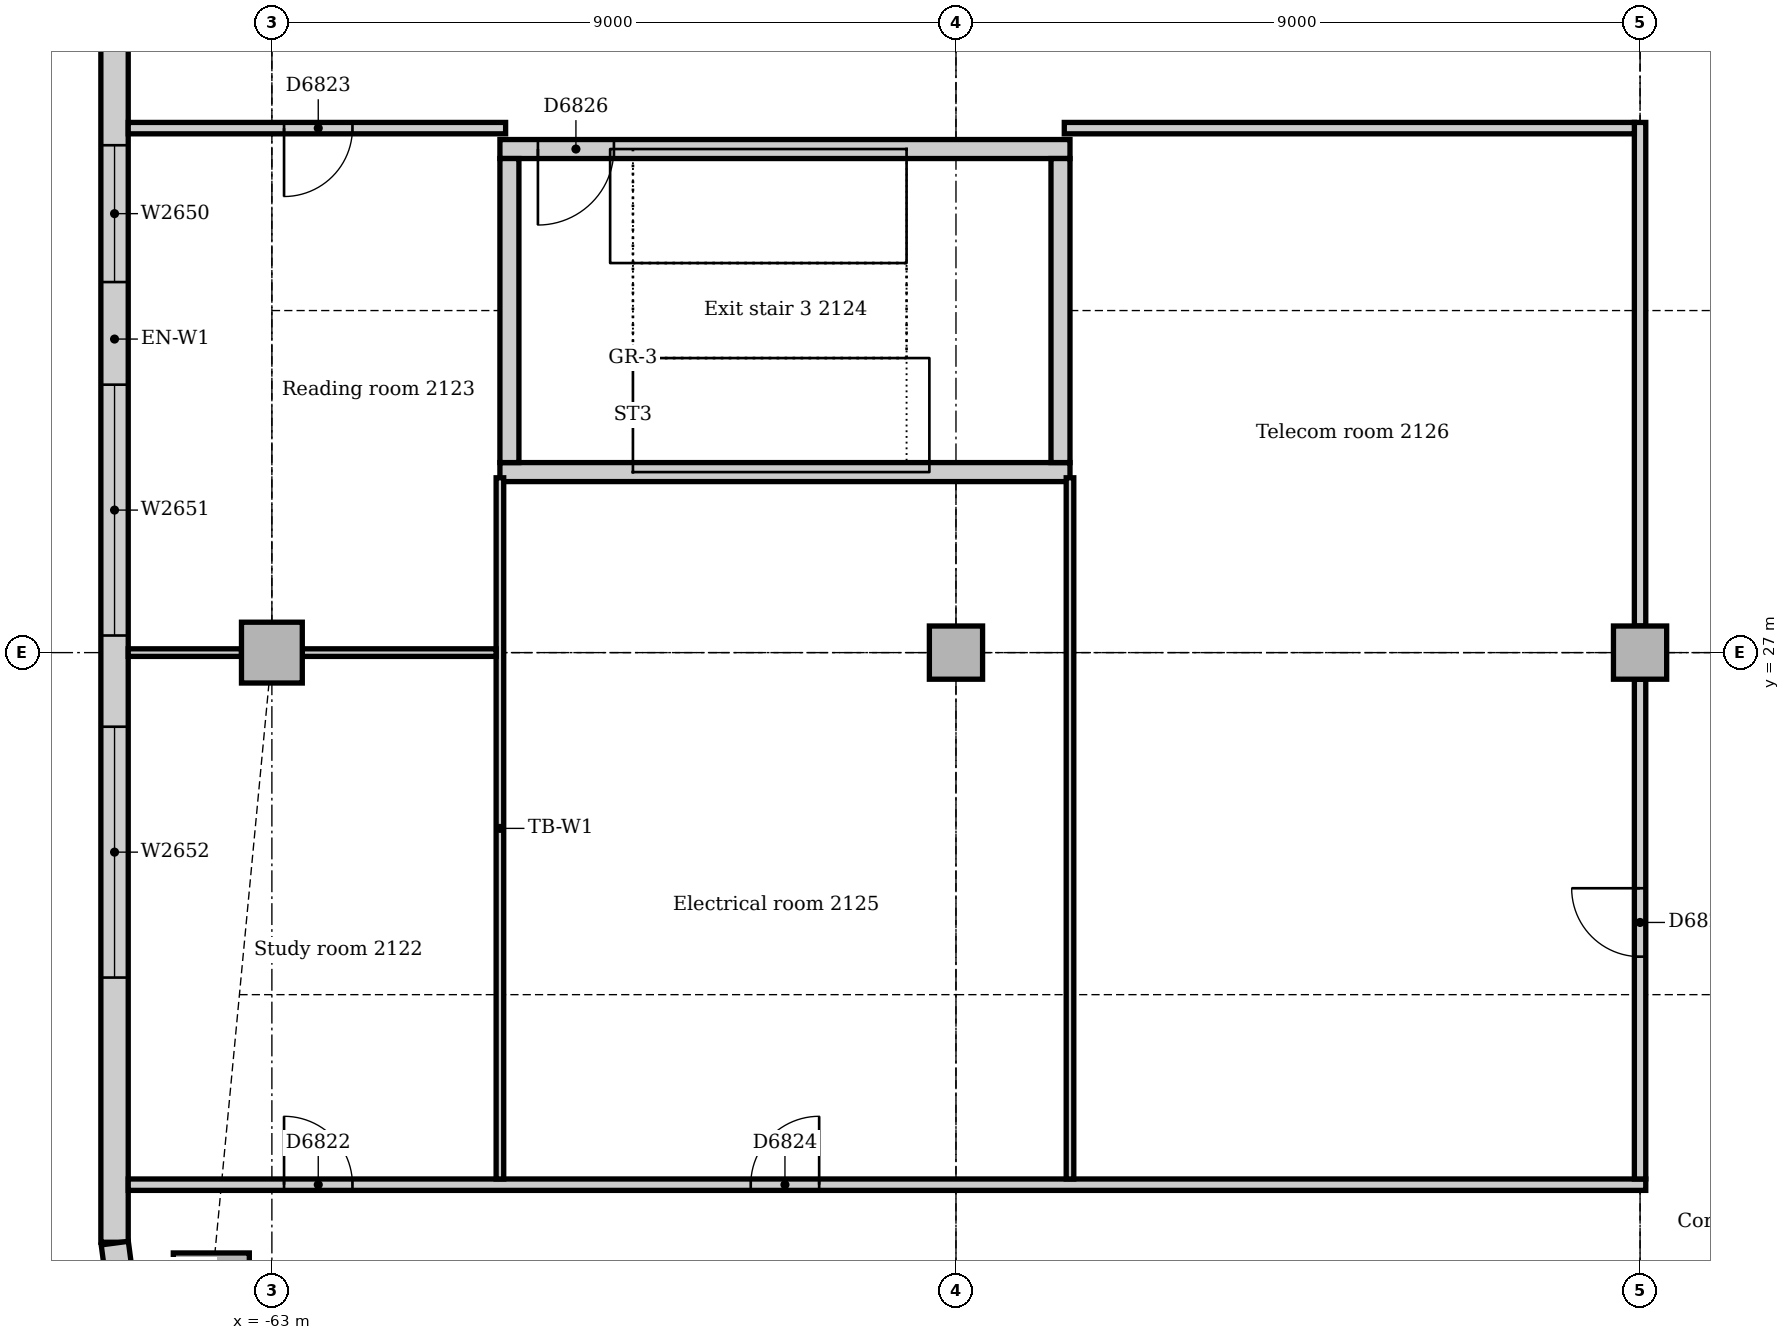
"""IFC4 building model, lengths in metres.
Left out: names, types, materials, properties, quantities, classifications, styles, units other than length and angle.
Written with IfcOpenShell. Run it as: python <this file> out.ifc"""

import sys

from ifc_helpers import new_model, si_unit, direction, frame, frame_2d, origin, origin_2d, place, context, subcontext, project, spatial, rectangle, extrude, element, fill, save


model = new_model("IFC4")
c1 = context("Model", 3, precision=1e-05, world=origin(), true_north=direction((0.0, 1.0)))
c2 = subcontext(c1, "Body", "Model", "MODEL_VIEW")
j1 = project(units=[si_unit("LENGTHUNIT", "METRE"), si_unit("PLANEANGLEUNIT", "RADIAN")], contexts=[c1])
p1 = place(None, origin())
s1 = spatial("IfcSite", under=j1, at=p1, CompositionType="ELEMENT")
p2 = place(p1, origin())
s2 = spatial("IfcBuilding", under=s1, at=p2, CompositionType="ELEMENT")
p3 = place(p2, frame((0.0, 0.0, 91.0)))
s3 = spatial("IfcBuildingStorey", under=s2, at=p3, CompositionType="ELEMENT", Elevation=91.0)
p4 = place(p3, frame((-60.0, 29.375, 0.0), z_axis=(0.0, 0.0, 1.0), x_axis=(1.0, 0.0, 0.0)))
e1 = element("IfcWall", 1, at=p4, inside=s3, PredefinedType="SOLIDWALL", context=c2, shape_type="SweptSolid", body=[
    extrude(rectangle(XDim=7.5, YDim=0.25, at=frame_2d((3.75, 0.0))), origin(), (0.0, 0.0, 1.0), 4.0),
])
p5 = place(p3, frame((-52.5, 33.625, 0.0), z_axis=(0.0, 0.0, 1.0), x_axis=(-1.0, 0.0, 0.0)))
e2 = element("IfcWall", 2, at=p5, inside=s3, PredefinedType="SOLIDWALL", context=c2, shape_type="SweptSolid", body=[
    extrude(rectangle(XDim=7.5, YDim=0.25, at=frame_2d((3.75, 0.0))), origin(), (0.0, 0.0, 1.0), 4.0),
])
p6 = place(p5, frame((6.0, 0.0, 0.0)))
e3 = element("IfcOpeningElement", 3, at=p6, cuts=e2, PredefinedType="OPENING", context=c2, shape_type="SweptSolid", body=[
    extrude(rectangle(XDim=1.0, YDim=2.1, at=frame_2d((0.5, 1.05))), frame((0.0, 0.135, 0.0), z_axis=(0.0, -1.0, 0.0), x_axis=(1.0, 0.0, 0.0)), (0.0, 0.0, 1.0), 0.27),
])
for number, where, z_axis, x_axis in (
    (4, (-52.625, 29.5, 0.0), (0.0, 0.0, 1.0), (0.0, 1.0, 0.0)),
    (5, (-59.875, 33.5, 0.0), (0.0, 0.0, 1.0), (0.0, -1.0, 0.0)),
):
    element("IfcWall", number, at=place(p3, frame(where, z_axis=z_axis, x_axis=x_axis)), inside=s3, PredefinedType="SOLIDWALL", context=c2, shape_type="SweptSolid", body=[
        extrude(rectangle(XDim=4.0, YDim=0.25, at=frame_2d((2.0, 0.0))), origin(), (0.0, 0.0, 1.0), 4.0),
    ])
p7 = place(p3, frame((-63.797, 18.602, 0.0), z_axis=(0.0, 0.0, 1.0), x_axis=(1.0, 0.0, 0.0)))
e6 = element("IfcColumn", 6, at=p7, inside=s3, PredefinedType="COLUMN", context=c2, shape_type="SweptSolid", body=[
    extrude(rectangle(XDim=1.0, YDim=1.0, at=origin_2d()), origin(), (0.0, 0.0, 1.0), 3.7),
])
p8 = place(p3, frame((-63.0, 27.0, 0.0), z_axis=(0.0, 0.0, 1.0), x_axis=(1.0, 0.0, 0.0)))
e7 = element("IfcColumn", 7, at=p8, inside=s3, PredefinedType="COLUMN", context=c2, shape_type="SweptSolid", body=[
    extrude(rectangle(XDim=0.8, YDim=0.8, at=origin_2d()), origin(), (0.0, 0.0, 1.0), 3.7),
])
for number, where, z_axis, x_axis in (
    (8, (-54.0, 27.0, 0.0), (0.0, 0.0, 1.0), (1.0, 0.0, 0.0)),
    (9, (-45.0, 27.0, 0.0), (0.0, 0.0, 1.0), (1.0, 0.0, 0.0)),
):
    element("IfcColumn", number, at=place(p3, frame(where, z_axis=z_axis, x_axis=x_axis)), inside=s3, PredefinedType="COLUMN", context=c2, shape_type="SweptSolid", body=[
        extrude(rectangle(XDim=0.7, YDim=0.7, at=origin_2d()), origin(), (0.0, 0.0, 1.0), 3.7),
    ])
p9 = place(p3, frame((-65.07, 43.007, 0.0), z_axis=(0.0, 0.0, 1.0), x_axis=(0.0, -1.0, 0.0)))
e10 = element("IfcWall", 10, at=p9, inside=s3, PredefinedType="STANDARD", context=c2, shape_type="SweptSolid", body=[
    extrude(rectangle(XDim=23.765, YDim=0.36, at=frame_2d((11.882, 0.0))), origin(), (0.0, 0.0, 1.0), 3.7),
])
p10 = place(p9, frame((4.232, 0.0, 0.9)))
e11 = element("IfcOpeningElement", 11, at=p10, cuts=e10, PredefinedType="OPENING", context=c2, shape_type="SweptSolid", body=[
    extrude(rectangle(XDim=1.8, YDim=1.6, at=frame_2d((0.9, 0.8))), frame((0.0, 0.19, 0.0), z_axis=(0.0, -1.0, 0.0), x_axis=(1.0, 0.0, 0.0)), (0.0, 0.0, 1.0), 0.38),
])
p11 = place(p9, frame((9.332, 0.0, 0.9)))
e12 = element("IfcOpeningElement", 12, at=p11, cuts=e10, PredefinedType="OPENING", context=c2, shape_type="SweptSolid", body=[
    extrude(rectangle(XDim=1.8, YDim=1.6, at=frame_2d((0.9, 0.8))), frame((0.0, 0.19, 0.0), z_axis=(0.0, -1.0, 0.0), x_axis=(1.0, 0.0, 0.0)), (0.0, 0.0, 1.0), 0.38),
])
p12 = place(p9, frame((12.482, 0.0, 0.9)))
e13 = element("IfcOpeningElement", 13, at=p12, cuts=e10, PredefinedType="OPENING", context=c2, shape_type="SweptSolid", body=[
    extrude(rectangle(XDim=3.3, YDim=1.6, at=frame_2d((1.65, 0.8))), frame((0.0, 0.19, 0.0), z_axis=(0.0, -1.0, 0.0), x_axis=(1.0, 0.0, 0.0)), (0.0, 0.0, 1.0), 0.38),
])
p13 = place(p9, frame((16.982, 0.0, 0.9)))
e14 = element("IfcOpeningElement", 14, at=p13, cuts=e10, PredefinedType="OPENING", context=c2, shape_type="SweptSolid", body=[
    extrude(rectangle(XDim=3.3, YDim=1.6, at=frame_2d((1.65, 0.8))), frame((0.0, 0.19, 0.0), z_axis=(0.0, -1.0, 0.0), x_axis=(1.0, 0.0, 0.0)), (0.0, 0.0, 1.0), 0.38),
])
p14 = place(p3, frame((-65.067, 19.231, 0.0), z_axis=(0.0, 0.0, 1.0), x_axis=(0.13055608231, -0.99144092581, 0.0)))
e15 = element("IfcWall", 15, at=p14, inside=s3, PredefinedType="STANDARD", context=c2, shape_type="SweptSolid", body=[
    extrude(rectangle(XDim=0.713, YDim=0.36, at=frame_2d((0.356, 0.0))), origin(), (0.0, 0.0, 1.0), 3.7),
])
p15 = place(p3, frame((-64.89, 20.0, 0.0), z_axis=(0.0, 0.0, 1.0), x_axis=(1.0, 0.0, 0.0)))
e16 = element("IfcWall", 16, at=p15, inside=s3, PredefinedType="PARTITIONING", context=c2, shape_type="SweptSolid", body=[
    extrude(rectangle(XDim=19.965, YDim=0.15, at=frame_2d((9.982, 0.0))), origin(), (0.0, 0.0, 1.0), 3.7),
])
p16 = place(p15, frame((2.05, 0.0, 0.0)))
e17 = element("IfcOpeningElement", 17, at=p16, cuts=e16, PredefinedType="OPENING", context=c2, shape_type="SweptSolid", body=[
    extrude(rectangle(XDim=0.9, YDim=2.1, at=frame_2d((0.45, 1.05))), frame((0.0, 0.085, 0.0), z_axis=(0.0, -1.0, 0.0), x_axis=(1.0, 0.0, 0.0)), (0.0, 0.0, 1.0), 0.17),
])
p17 = place(p15, frame((8.19, 0.0, 0.0)))
e18 = element("IfcOpeningElement", 18, at=p17, cuts=e16, PredefinedType="OPENING", context=c2, shape_type="SweptSolid", body=[
    extrude(rectangle(XDim=0.9, YDim=2.1, at=frame_2d((0.45, 1.05))), frame((0.0, 0.085, 0.0), z_axis=(0.0, -1.0, 0.0), x_axis=(1.0, 0.0, 0.0)), (0.0, 0.0, 1.0), 0.17),
])
p18 = place(p3, frame((-45.0, 20.075, 0.0), z_axis=(0.0, 0.0, 1.0), x_axis=(0.0, 1.0, 0.0)))
e19 = element("IfcWall", 19, at=p18, inside=s3, PredefinedType="PARTITIONING", context=c2, shape_type="SweptSolid", body=[
    extrude(rectangle(XDim=6.575, YDim=0.15, at=frame_2d((3.288, 0.0))), origin(), (0.0, 0.0, 1.0), 3.106),
])
p19 = place(p18, frame((2.925, 0.0, 0.0)))
e20 = element("IfcOpeningElement", 20, at=p19, cuts=e19, PredefinedType="OPENING", context=c2, shape_type="SweptSolid", body=[
    extrude(rectangle(XDim=0.9, YDim=2.1, at=frame_2d((0.45, 1.05))), frame((0.0, 0.085, 0.0), z_axis=(0.0, -1.0, 0.0), x_axis=(1.0, 0.0, 0.0)), (0.0, 0.0, 1.0), 0.17),
])
p20 = place(p3, frame((-45.0, 27.35, 0.0), z_axis=(0.0, 0.0, 1.0), x_axis=(0.0, 1.0, 0.0)))
e21 = element("IfcWall", 21, at=p20, inside=s3, PredefinedType="PARTITIONING", context=c2, shape_type="SweptSolid", body=[
    extrude(rectangle(XDim=6.625, YDim=0.15, at=frame_2d((3.312, 0.0))), origin(), (0.0, 0.0, 1.0), 3.106),
])
p21 = place(p3, frame((-52.575, 33.9, 0.0), z_axis=(0.0, 0.0, 1.0), x_axis=(1.0, 0.0, 0.0)))
e22 = element("IfcWall", 22, at=p21, inside=s3, PredefinedType="PARTITIONING", context=c2, shape_type="SweptSolid", body=[
    extrude(rectangle(XDim=7.5, YDim=0.15, at=frame_2d((3.75, 0.0))), origin(), (0.0, 0.0, 1.0), 3.7),
])
p22 = place(p3, frame((-64.89, 33.9, 0.0), z_axis=(0.0, 0.0, 1.0), x_axis=(1.0, 0.0, 0.0)))
e23 = element("IfcWall", 23, at=p22, inside=s3, PredefinedType="PARTITIONING", context=c2, shape_type="SweptSolid", body=[
    extrude(rectangle(XDim=4.965, YDim=0.15, at=frame_2d((2.482, 0.0))), origin(), (0.0, 0.0, 1.0), 3.7),
])
p23 = place(p22, frame((2.05, 0.0, 0.0)))
e24 = element("IfcOpeningElement", 24, at=p23, cuts=e23, PredefinedType="OPENING", context=c2, shape_type="SweptSolid", body=[
    extrude(rectangle(XDim=0.9, YDim=2.1, at=frame_2d((0.45, 1.05))), frame((0.0, 0.085, 0.0), z_axis=(0.0, -1.0, 0.0), x_axis=(1.0, 0.0, 0.0)), (0.0, 0.0, 1.0), 0.17),
])
for number, where, z_axis, x_axis in (
    (25, (-60.0, 20.075, 0.0), (0.0, 0.0, 1.0), (0.0, 1.0, 0.0)),
    (26, (-52.5, 20.075, 0.0), (0.0, 0.0, 1.0), (0.0, 1.0, 0.0)),
):
    element("IfcWall", number, at=place(p3, frame(where, z_axis=z_axis, x_axis=x_axis)), inside=s3, PredefinedType="PARTITIONING", context=c2, shape_type="SweptSolid", body=[
        extrude(rectangle(XDim=9.225, YDim=0.1, at=frame_2d((4.612, 0.0))), origin(), (0.0, 0.0, 1.0), 3.7),
    ])
p24 = place(p3, frame((-62.6, 27.0, 0.0), z_axis=(0.0, 0.0, 1.0), x_axis=(1.0, 0.0, 0.0)))
e27 = element("IfcWall", 27, at=p24, inside=s3, PredefinedType="PARTITIONING", context=c2, shape_type="SweptSolid", body=[
    extrude(rectangle(XDim=2.55, YDim=0.1, at=frame_2d((1.275, 0.0))), origin(), (0.0, 0.0, 1.0), 3.008),
])
p25 = place(p3, frame((-64.89, 27.0, 0.0), z_axis=(0.0, 0.0, 1.0), x_axis=(1.0, 0.0, 0.0)))
e28 = element("IfcWall", 28, at=p25, inside=s3, PredefinedType="PARTITIONING", context=c2, shape_type="SweptSolid", body=[
    extrude(rectangle(XDim=1.49, YDim=0.1, at=frame_2d((0.745, 0.0))), origin(), (0.0, 0.0, 1.0), 3.7),
])
p26 = place(p11, origin())
e29 = element("IfcWindow", 29, at=p26, inside=s3, PartitioningType="SINGLE_PANEL", PredefinedType="WINDOW", context=c2, shape_type="SweptSolid", body=[
    extrude(rectangle(XDim=1.8, YDim=1.6, at=frame_2d((0.9, 0.8))), frame((0.0, 0.13, 0.0), z_axis=(0.0, -1.0, 0.0), x_axis=(1.0, 0.0, 0.0)), (0.0, 0.0, 1.0), 0.06),
])
fill(e12, e29)
p27 = place(p12, origin())
e30 = element("IfcWindow", 30, at=p27, inside=s3, PartitioningType="SINGLE_PANEL", PredefinedType="WINDOW", context=c2, shape_type="SweptSolid", body=[
    extrude(rectangle(XDim=3.3, YDim=1.6, at=frame_2d((1.65, 0.8))), frame((0.0, 0.13, 0.0), z_axis=(0.0, -1.0, 0.0), x_axis=(1.0, 0.0, 0.0)), (0.0, 0.0, 1.0), 0.06),
])
fill(e13, e30)
p28 = place(p13, origin())
e31 = element("IfcWindow", 31, at=p28, inside=s3, PartitioningType="SINGLE_PANEL", PredefinedType="WINDOW", context=c2, shape_type="SweptSolid", body=[
    extrude(rectangle(XDim=3.3, YDim=1.6, at=frame_2d((1.65, 0.8))), frame((0.0, 0.13, 0.0), z_axis=(0.0, -1.0, 0.0), x_axis=(1.0, 0.0, 0.0)), (0.0, 0.0, 1.0), 0.06),
])
fill(e14, e31)
p29 = place(p16, origin())
e32 = element("IfcDoor", 32, at=p29, inside=s3, OperationType="SINGLE_SWING_LEFT", PredefinedType="DOOR", context=c2, shape_type="SweptSolid", body=[
    extrude(rectangle(XDim=0.9, YDim=2.1, at=frame_2d((0.45, 1.05))), frame((0.0, 0.025, 0.0), z_axis=(0.0, -1.0, 0.0), x_axis=(1.0, 0.0, 0.0)), (0.0, 0.0, 1.0), 0.05),
])
fill(e17, e32)
p30 = place(p23, frame((0.9, 0.0, 0.0), z_axis=(0.0, 0.0, 1.0), x_axis=(-1.0, 0.0, 0.0)))
e33 = element("IfcDoor", 33, at=p30, inside=s3, OperationType="SINGLE_SWING_RIGHT", PredefinedType="DOOR", context=c2, shape_type="SweptSolid", body=[
    extrude(rectangle(XDim=0.9, YDim=2.1, at=frame_2d((0.45, 1.05))), frame((0.0, 0.025, 0.0), z_axis=(0.0, -1.0, 0.0), x_axis=(1.0, 0.0, 0.0)), (0.0, 0.0, 1.0), 0.05),
])
fill(e24, e33)
p31 = place(p17, origin())
e34 = element("IfcDoor", 34, at=p31, inside=s3, OperationType="SINGLE_SWING_RIGHT", PredefinedType="DOOR", context=c2, shape_type="SweptSolid", body=[
    extrude(rectangle(XDim=0.9, YDim=2.1, at=frame_2d((0.45, 1.05))), frame((0.0, 0.025, 0.0), z_axis=(0.0, -1.0, 0.0), x_axis=(1.0, 0.0, 0.0)), (0.0, 0.0, 1.0), 0.05),
])
fill(e18, e34)
p32 = place(p19, origin())
e35 = element("IfcDoor", 35, at=p32, inside=s3, OperationType="SINGLE_SWING_RIGHT", PredefinedType="DOOR", context=c2, shape_type="SweptSolid", body=[
    extrude(rectangle(XDim=0.9, YDim=2.1, at=frame_2d((0.45, 1.05))), frame((0.0, 0.025, 0.0), z_axis=(0.0, -1.0, 0.0), x_axis=(1.0, 0.0, 0.0)), (0.0, 0.0, 1.0), 0.05),
])
fill(e20, e35)
p33 = place(p6, origin())
e36 = element("IfcDoor", 36, at=p33, inside=s3, OperationType="SINGLE_SWING_RIGHT", PredefinedType="DOOR", context=c2, shape_type="SweptSolid", body=[
    extrude(rectangle(XDim=1.0, YDim=2.1, at=frame_2d((0.5, 1.05))), frame((0.0, 0.025, 0.0), z_axis=(0.0, -1.0, 0.0), x_axis=(1.0, 0.0, 0.0)), (0.0, 0.0, 1.0), 0.05),
])
fill(e3, e36)
save(model, sys.argv[1])
